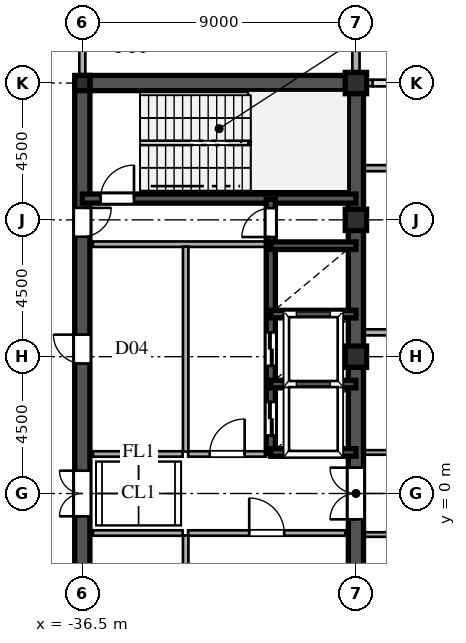
"""IFC4 building model, lengths in metres.
Left out: names, types, materials, properties, quantities, classifications, styles, units other than length and angle.
Written with IfcOpenShell. Run it as: python <this file> out.ifc"""

import sys

from ifc_helpers import new_model, si_unit, direction, frame, frame_2d, origin, origin_2d, place, context, subcontext, project, spatial, rectangle, hollow_rectangle, i_section, extrude, source, transform, mapped, element, fill, save


model = new_model("IFC4")
c1 = context("Model", 3, precision=1e-05, world=origin(), true_north=direction((0.0, 1.0)))
c2 = subcontext(c1, "Body", "Model", "MODEL_VIEW")
j1 = project(units=[si_unit("LENGTHUNIT", "METRE"), si_unit("PLANEANGLEUNIT", "RADIAN")], contexts=[c1])
p1 = place(None, origin())
s1 = spatial("IfcSite", under=j1, at=p1, CompositionType="ELEMENT")
p2 = place(p1, origin())
s2 = spatial("IfcBuilding", under=s1, at=p2, CompositionType="ELEMENT")
p3 = place(p2, frame((0.0, 0.0, 234.6)))
s3 = spatial("IfcBuildingStorey", under=s2, at=p3, CompositionType="ELEMENT", Elevation=234.6)
m1 = source(origin(), c2, "Body", "SweptSolid", [
    extrude(hollow_rectangle(XDim=0.7, YDim=0.7, WallThickness=0.03, at=origin_2d()), origin(), (0.0, 0.0, 1.0), 4.8),
])
for number, where, z_axis, x_axis in (
    (1, (-27.5, 4.5, 0.0), (0.0, 0.0, 1.0), (1.0, 0.0, 0.0)),
    (2, (-27.5, 9.0, 0.0), (0.0, 0.0, 1.0), (1.0, 0.0, 0.0)),
    (3, (-27.5, 13.5, 0.0), (0.0, 0.0, 1.0), (1.0, 0.0, 0.0)),
):
    element("IfcColumn", number, at=place(p3, frame(where, z_axis=z_axis, x_axis=x_axis)), inside=s3, PredefinedType="COLUMN", context=c2, shape_type="MappedRepresentation", body=[
        mapped(m1, transform((0.0, 0.0, 0.0), scale=1.0)),
    ])
m2 = source(origin(), c2, "Body", "SweptSolid", [
    extrude(i_section(OverallWidth=0.5, OverallDepth=0.5, WebThickness=0.02, FlangeThickness=0.032, at=origin_2d()), origin(), (0.0, 0.0, 1.0), 4.8),
])
p4 = place(p3, frame((-36.5, 13.5, 0.0), z_axis=(0.0, 0.0, 1.0), x_axis=(1.0, 0.0, 0.0)))
e4 = element("IfcColumn", 4, at=p4, inside=s3, PredefinedType="COLUMN", context=c2, shape_type="MappedRepresentation", body=[
    mapped(m2, transform((0.0, 0.0, 0.0), scale=1.0)),
])
p5 = place(p3, frame((-27.5, 13.755, 0.0), z_axis=(0.0, 0.0, 1.0), x_axis=(0.0, 1.0, 0.0)))
e5 = element("IfcWall", 5, at=p5, inside=s3, PredefinedType="SOLIDWALL", context=c2, shape_type="SweptSolid", body=[
    extrude(rectangle(XDim=0.62, YDim=0.24, at=frame_2d((0.31, 0.0))), origin(), (0.0, 0.0, 1.0), 4.08),
])
p6 = place(p3, frame((-27.5, 14.375, 0.0), z_axis=(0.0, 0.0, 1.0), x_axis=(0.0, 1.0, 0.0)))
e6 = element("IfcWall", 6, at=p6, inside=s3, PredefinedType="SOLIDWALL", context=c2, shape_type="SweptSolid", body=[
    extrude(rectangle(XDim=1.605, YDim=0.24, at=frame_2d((0.803, 0.0))), origin(), (0.0, 0.0, 1.0), 4.58),
])
p7 = place(p3, frame((-27.49, 13.5, 0.0), z_axis=(0.0, 0.0, 1.0), x_axis=(1.0, 0.0, 0.0)))
e7 = element("IfcWall", 7, at=p7, inside=s3, PredefinedType="SOLIDWALL", context=c2, shape_type="SweptSolid", body=[
    extrude(rectangle(XDim=0.54, YDim=0.21, at=frame_2d((0.27, 0.0))), origin(), (0.0, 0.0, 1.0), 2.78),
])
for number, where, z_axis, x_axis in (
    (8, (-27.5, -13.5, 0.0), (0.0, 0.0, 1.0), (0.0, 1.0, 0.0)),
    (9, (-27.5, 1.3, 0.0), (0.0, 0.0, 1.0), (0.0, 1.0, 0.0)),
):
    element("IfcWall", number, at=place(p3, frame(where, z_axis=z_axis, x_axis=x_axis)), inside=s3, PredefinedType="SHEAR", context=c2, shape_type="SweptSolid", body=[
        extrude(rectangle(XDim=12.2, YDim=0.5, at=frame_2d((6.1, 0.0))), origin(), (0.0, 0.0, 1.0), 4.58),
    ])
p8 = place(p3, frame((-27.5, -1.3, 0.0), z_axis=(0.0, 0.0, 1.0), x_axis=(0.0, 1.0, 0.0)))
e10 = element("IfcWall", 10, at=p8, inside=s3, PredefinedType="SHEAR", context=c2, shape_type="SweptSolid", body=[
    extrude(rectangle(XDim=2.6, YDim=0.5, at=frame_2d((1.3, 0.0))), origin(), (0.0, 0.0, 1.0), 4.58),
])
p9 = place(p8, frame((0.45, 0.0, 0.0)))
e11 = element("IfcOpeningElement", 11, at=p9, cuts=e10, PredefinedType="OPENING", context=c2, shape_type="SweptSolid", body=[
    extrude(rectangle(XDim=1.7, YDim=2.35, at=frame_2d((0.85, 1.175))), frame((0.0, 0.26, 0.0), z_axis=(0.0, -1.0, 0.0), x_axis=(1.0, 0.0, 0.0)), (0.0, 0.0, 1.0), 0.52),
])
p10 = place(p3, frame((-36.5, 13.5, 0.0), z_axis=(0.0, 0.0, 1.0), x_axis=(1.0, 0.0, 0.0)))
e12 = element("IfcWall", 12, at=p10, inside=s3, PredefinedType="SHEAR", context=c2, shape_type="SweptSolid", body=[
    extrude(rectangle(XDim=9.0, YDim=0.5, at=frame_2d((4.5, 0.0))), origin(), (0.0, 0.0, 1.0), 4.58),
])
p11 = place(p3, frame((-36.5, -1.3, 0.0), z_axis=(0.0, 0.0, 1.0), x_axis=(0.0, 1.0, 0.0)))
e13 = element("IfcWall", 13, at=p11, inside=s3, PredefinedType="SHEAR", context=c2, shape_type="SweptSolid", body=[
    extrude(rectangle(XDim=2.6, YDim=0.5, at=frame_2d((1.3, 0.0))), origin(), (0.0, 0.0, 1.0), 4.58),
])
p12 = place(p11, frame((0.55, 0.0, 0.0)))
e14 = element("IfcOpeningElement", 14, at=p12, cuts=e13, PredefinedType="OPENING", context=c2, shape_type="SweptSolid", body=[
    extrude(rectangle(XDim=1.5, YDim=2.3, at=frame_2d((0.75, 1.15))), frame((0.0, 0.26, 0.0), z_axis=(0.0, -1.0, 0.0), x_axis=(1.0, 0.0, 0.0)), (0.0, 0.0, 1.0), 0.52),
])
p13 = place(p3, frame((-36.5, 8.2, 0.0), z_axis=(0.0, 0.0, 1.0), x_axis=(0.0, 1.0, 0.0)))
e15 = element("IfcWall", 15, at=p13, inside=s3, PredefinedType="SHEAR", context=c2, shape_type="SweptSolid", body=[
    extrude(rectangle(XDim=5.45, YDim=0.5, at=frame_2d((2.725, 0.0))), origin(), (0.0, 0.0, 1.0), 4.58),
])
p14 = place(p13, frame((0.245, 0.0, 0.0)))
e16 = element("IfcOpeningElement", 16, at=p14, cuts=e15, PredefinedType="OPENING", context=c2, shape_type="SweptSolid", body=[
    extrude(rectangle(XDim=0.95, YDim=2.15, at=frame_2d((0.475, 1.075))), frame((0.0, 0.26, 0.0), z_axis=(0.0, -1.0, 0.0), x_axis=(1.0, 0.0, 0.0)), (0.0, 0.0, 1.0), 0.52),
])
p15 = place(p3, frame((-36.5, -6.5, 0.0), z_axis=(0.0, 0.0, 1.0), x_axis=(0.0, 1.0, 0.0)))
e17 = element("IfcWall", 17, at=p15, inside=s3, PredefinedType="SHEAR", context=c2, shape_type="SweptSolid", body=[
    extrude(rectangle(XDim=5.2, YDim=0.5, at=frame_2d((2.6, 0.0))), origin(), (0.0, 0.0, 1.0), 4.58),
])
p16 = place(p15, frame((2.125, 0.0, 0.0)))
e18 = element("IfcOpeningElement", 18, at=p16, cuts=e17, PredefinedType="OPENING", context=c2, shape_type="SweptSolid", body=[
    extrude(rectangle(XDim=0.95, YDim=2.15, at=frame_2d((0.475, 1.075))), frame((0.0, 0.26, 0.0), z_axis=(0.0, -1.0, 0.0), x_axis=(1.0, 0.0, 0.0)), (0.0, 0.0, 1.0), 0.52),
])
p17 = place(p3, frame((-36.5, 1.3, 0.0), z_axis=(0.0, 0.0, 1.0), x_axis=(0.0, 1.0, 0.0)))
e19 = element("IfcWall", 19, at=p17, inside=s3, PredefinedType="SHEAR", context=c2, shape_type="SweptSolid", body=[
    extrude(rectangle(XDim=6.9, YDim=0.5, at=frame_2d((3.45, 0.0))), origin(), (0.0, 0.0, 1.0), 4.58),
])
p18 = place(p17, frame((2.975, 0.0, 0.0)))
e20 = element("IfcOpeningElement", 20, at=p18, cuts=e19, PredefinedType="OPENING", context=c2, shape_type="SweptSolid", body=[
    extrude(rectangle(XDim=0.95, YDim=2.15, at=frame_2d((0.475, 1.075))), frame((0.0, 0.26, 0.0), z_axis=(0.0, -1.0, 0.0), x_axis=(1.0, 0.0, 0.0)), (0.0, 0.0, 1.0), 0.52),
])
p19 = place(p3, frame((-36.5, 9.7, 0.0), z_axis=(0.0, 0.0, 1.0), x_axis=(1.0, 0.0, 0.0)))
e21 = element("IfcWall", 21, at=p19, inside=s3, PredefinedType="SHEAR", context=c2, shape_type="SweptSolid", body=[
    extrude(rectangle(XDim=9.0, YDim=0.3, at=frame_2d((4.5, 0.0))), origin(), (0.0, 0.0, 1.0), 4.58),
])
p20 = place(p19, frame((0.6, 0.0, 0.0)))
e22 = element("IfcOpeningElement", 22, at=p20, cuts=e21, PredefinedType="OPENING", context=c2, shape_type="SweptSolid", body=[
    extrude(rectangle(XDim=1.1, YDim=2.2, at=frame_2d((0.55, 1.1))), frame((0.0, 0.16, 0.0), z_axis=(0.0, -1.0, 0.0), x_axis=(1.0, 0.0, 0.0)), (0.0, 0.0, 1.0), 0.32),
])
for number, where, z_axis, x_axis in (
    (23, (-30.3, 1.35, 0.0), (0.0, 0.0, 1.0), (1.0, 0.0, 0.0)),
    (24, (-30.3, 3.6, 0.0), (0.0, 0.0, 1.0), (1.0, 0.0, 0.0)),
    (25, (-30.3, 5.9, 0.0), (0.0, 0.0, 1.0), (1.0, 0.0, 0.0)),
    (26, (-30.3, 8.15, 0.0), (0.0, 0.0, 1.0), (1.0, 0.0, 0.0)),
):
    element("IfcWall", number, at=place(p3, frame(where, z_axis=z_axis, x_axis=x_axis)), inside=s3, PredefinedType="SHEAR", context=c2, shape_type="SweptSolid", body=[
        extrude(rectangle(XDim=2.8, YDim=0.25, at=frame_2d((1.4, 0.0))), origin(), (0.0, 0.0, 1.0), 4.58),
    ])
p21 = place(p3, frame((-30.3, 1.32, 0.0), z_axis=(0.0, 0.0, 1.0), x_axis=(0.0, 1.0, 0.0)))
e27 = element("IfcWall", 27, at=p21, inside=s3, PredefinedType="SHEAR", context=c2, shape_type="SweptSolid", body=[
    extrude(rectangle(XDim=2.28, YDim=0.3, at=frame_2d((1.14, 0.0))), origin(), (0.0, 0.0, 1.0), 4.58),
])
p22 = place(p21, frame((0.59, 0.0, 0.0)))
e28 = element("IfcOpeningElement", 28, at=p22, cuts=e27, PredefinedType="OPENING", context=c2, shape_type="SweptSolid", body=[
    extrude(rectangle(XDim=1.1, YDim=2.2, at=frame_2d((0.55, 1.1))), frame((0.0, 0.16, 0.0), z_axis=(0.0, -1.0, 0.0), x_axis=(1.0, 0.0, 0.0)), (0.0, 0.0, 1.0), 0.32),
])
p23 = place(p3, frame((-30.3, 3.6, 0.0), z_axis=(0.0, 0.0, 1.0), x_axis=(0.0, 1.0, 0.0)))
e29 = element("IfcWall", 29, at=p23, inside=s3, PredefinedType="SHEAR", context=c2, shape_type="SweptSolid", body=[
    extrude(rectangle(XDim=2.3, YDim=0.3, at=frame_2d((1.15, 0.0))), origin(), (0.0, 0.0, 1.0), 4.58),
])
p24 = place(p23, frame((0.6, 0.0, 0.0)))
e30 = element("IfcOpeningElement", 30, at=p24, cuts=e29, PredefinedType="OPENING", context=c2, shape_type="SweptSolid", body=[
    extrude(rectangle(XDim=1.1, YDim=2.2, at=frame_2d((0.55, 1.1))), frame((0.0, 0.16, 0.0), z_axis=(0.0, -1.0, 0.0), x_axis=(1.0, 0.0, 0.0)), (0.0, 0.0, 1.0), 0.32),
])
p25 = place(p3, frame((-30.3, 5.9, 0.0), z_axis=(0.0, 0.0, 1.0), x_axis=(0.0, 1.0, 0.0)))
e31 = element("IfcWall", 31, at=p25, inside=s3, PredefinedType="SHEAR", context=c2, shape_type="SweptSolid", body=[
    extrude(rectangle(XDim=2.25, YDim=0.3, at=frame_2d((1.125, 0.0))), origin(), (0.0, 0.0, 1.0), 4.58),
])
p26 = place(p3, frame((-30.3, 8.15, 0.0), z_axis=(0.0, 0.0, 1.0), x_axis=(0.0, 1.0, 0.0)))
e32 = element("IfcWall", 32, at=p26, inside=s3, PredefinedType="SHEAR", context=c2, shape_type="SweptSolid", body=[
    extrude(rectangle(XDim=1.53, YDim=0.3, at=frame_2d((0.765, 0.0))), origin(), (0.0, 0.0, 1.0), 4.58),
])
p27 = place(p26, frame((0.285, 0.0, 0.0)))
e33 = element("IfcOpeningElement", 33, at=p27, cuts=e32, PredefinedType="OPENING", context=c2, shape_type="SweptSolid", body=[
    extrude(rectangle(XDim=0.95, YDim=2.15, at=frame_2d((0.475, 1.075))), frame((0.0, 0.16, 0.0), z_axis=(0.0, -1.0, 0.0), x_axis=(1.0, 0.0, 0.0)), (0.0, 0.0, 1.0), 0.32),
])
p28 = place(p3, frame((-36.15, 8.2, 0.0), z_axis=(0.0, 0.0, 1.0), x_axis=(1.0, 0.0, 0.0)))
e34 = element("IfcWall", 34, at=p28, inside=s3, PredefinedType="PARTITIONING", context=c2, shape_type="SweptSolid", body=[
    extrude(rectangle(XDim=5.7, YDim=0.18, at=frame_2d((2.85, 0.0))), origin(), (0.0, 0.0, 1.0), 4.58),
])
p29 = place(p3, frame((-33.1, -6.42, 0.0), z_axis=(0.0, 0.0, 1.0), x_axis=(0.0, 1.0, 0.0)))
e35 = element("IfcWall", 35, at=p29, inside=s3, PredefinedType="PARTITIONING", context=c2, shape_type="SweptSolid", body=[
    extrude(rectangle(XDim=5.04, YDim=0.18, at=frame_2d((2.52, 0.0))), origin(), (0.0, 0.0, 1.0), 4.58),
])
p30 = place(p3, frame((-33.1, 1.38, 0.0), z_axis=(0.0, 0.0, 1.0), x_axis=(0.0, 1.0, 0.0)))
e36 = element("IfcWall", 36, at=p30, inside=s3, PredefinedType="PARTITIONING", context=c2, shape_type="SweptSolid", body=[
    extrude(rectangle(XDim=6.74, YDim=0.18, at=frame_2d((3.37, 0.0))), origin(), (0.0, 0.0, 1.0), 4.58),
])
p31 = place(p3, frame((-33.02, -1.3, 0.0), z_axis=(0.0, 0.0, 1.0), x_axis=(1.0, 0.0, 0.0)))
e37 = element("IfcWall", 37, at=p31, inside=s3, PredefinedType="PARTITIONING", context=c2, shape_type="SweptSolid", body=[
    extrude(rectangle(XDim=5.17, YDim=0.18, at=frame_2d((2.585, 0.0))), origin(), (0.0, 0.0, 1.0), 4.58),
])
p32 = place(p31, frame((2.01, 0.0, 0.0)))
e38 = element("IfcOpeningElement", 38, at=p32, cuts=e37, PredefinedType="OPENING", context=c2, shape_type="SweptSolid", body=[
    extrude(rectangle(XDim=1.15, YDim=2.2, at=frame_2d((0.575, 1.1))), frame((0.0, 0.1, 0.0), z_axis=(0.0, -1.0, 0.0), x_axis=(1.0, 0.0, 0.0)), (0.0, 0.0, 1.0), 0.2),
])
p33 = place(p3, frame((-33.02, 1.3, 0.0), z_axis=(0.0, 0.0, 1.0), x_axis=(1.0, 0.0, 0.0)))
e39 = element("IfcWall", 39, at=p33, inside=s3, PredefinedType="PARTITIONING", context=c2, shape_type="SweptSolid", body=[
    extrude(rectangle(XDim=2.57, YDim=0.18, at=frame_2d((1.285, 0.0))), origin(), (0.0, 0.0, 1.0), 4.58),
])
p34 = place(p33, frame((0.71, 0.0, 0.0)))
e40 = element("IfcOpeningElement", 40, at=p34, cuts=e39, PredefinedType="OPENING", context=c2, shape_type="SweptSolid", body=[
    extrude(rectangle(XDim=1.15, YDim=2.2, at=frame_2d((0.575, 1.1))), frame((0.0, 0.1, 0.0), z_axis=(0.0, -1.0, 0.0), x_axis=(1.0, 0.0, 0.0)), (0.0, 0.0, 1.0), 0.2),
])
for number, where, z_axis, x_axis in (
    (41, (-36.15, -1.3, 0.0), (0.0, 0.0, 1.0), (1.0, 0.0, 0.0)),
    (42, (-36.15, 1.3, 0.0), (0.0, 0.0, 1.0), (1.0, 0.0, 0.0)),
):
    element("IfcWall", number, at=place(p3, frame(where, z_axis=z_axis, x_axis=x_axis)), inside=s3, PredefinedType="PARTITIONING", context=c2, shape_type="SweptSolid", body=[
        extrude(rectangle(XDim=2.95, YDim=0.18, at=frame_2d((1.475, 0.0))), origin(), (0.0, 0.0, 1.0), 4.58),
    ])
p35 = place(p3, frame((-27.245, -1.35, 0.0), z_axis=(0.0, 0.0, 1.0), x_axis=(1.0, 0.0, 0.0)))
e43 = element("IfcWall", 43, at=p35, inside=s3, PredefinedType="PARTITIONING", context=c2, shape_type="SweptSolid", body=[
    extrude(rectangle(XDim=19.46, YDim=0.15, at=frame_2d((9.73, 0.0))), origin(), (0.0, 0.0, 1.0), 4.58),
])
p36 = place(p35, frame((13.02, 0.0, 0.0)))
e44 = element("IfcOpeningElement", 44, at=p36, cuts=e43, PredefinedType="OPENING", context=c2, shape_type="SweptSolid", body=[
    extrude(rectangle(XDim=0.95, YDim=2.15, at=frame_2d((0.475, 1.075))), frame((0.0, 0.085, 0.0), z_axis=(0.0, -1.0, 0.0), x_axis=(1.0, 0.0, 0.0)), (0.0, 0.0, 1.0), 0.17),
])
p37 = place(p3, frame((-27.245, 1.35, 0.0), z_axis=(0.0, 0.0, 1.0), x_axis=(1.0, 0.0, 0.0)))
e45 = element("IfcWall", 45, at=p37, inside=s3, PredefinedType="PARTITIONING", context=c2, shape_type="SweptSolid", body=[
    extrude(rectangle(XDim=19.46, YDim=0.15, at=frame_2d((9.73, 0.0))), origin(), (0.0, 0.0, 1.0), 4.58),
])
p38 = place(p37, frame((13.02, 0.0, 0.0)))
e46 = element("IfcOpeningElement", 46, at=p38, cuts=e45, PredefinedType="OPENING", context=c2, shape_type="SweptSolid", body=[
    extrude(rectangle(XDim=0.95, YDim=2.15, at=frame_2d((0.475, 1.075))), frame((0.0, 0.085, 0.0), z_axis=(0.0, -1.0, 0.0), x_axis=(1.0, 0.0, 0.0)), (0.0, 0.0, 1.0), 0.17),
])
p39 = place(p3, frame((-27.245, 5.3, 0.0), z_axis=(0.0, 0.0, 1.0), x_axis=(1.0, 0.0, 0.0)))
e47 = element("IfcWall", 47, at=p39, inside=s3, PredefinedType="PARTITIONING", context=c2, shape_type="SweptSolid", body=[
    extrude(rectangle(XDim=54.49, YDim=0.2, at=frame_2d((27.245, 0.0))), origin(), (0.0, 0.0, 1.0), 4.58),
])
p40 = place(p39, frame((25.77, 0.0, 0.0)))
e48 = element("IfcOpeningElement", 48, at=p40, cuts=e47, PredefinedType="OPENING", context=c2, shape_type="SweptSolid", body=[
    extrude(rectangle(XDim=1.15, YDim=2.2, at=frame_2d((0.575, 1.1))), frame((0.0, 0.11, 0.0), z_axis=(0.0, -1.0, 0.0), x_axis=(1.0, 0.0, 0.0)), (0.0, 0.0, 1.0), 0.22),
])
p41 = place(p39, frame((35.17, 0.0, 0.0)))
e49 = element("IfcOpeningElement", 49, at=p41, cuts=e47, PredefinedType="OPENING", context=c2, shape_type="SweptSolid", body=[
    extrude(rectangle(XDim=1.15, YDim=2.2, at=frame_2d((0.575, 1.1))), frame((0.0, 0.11, 0.0), z_axis=(0.0, -1.0, 0.0), x_axis=(1.0, 0.0, 0.0)), (0.0, 0.0, 1.0), 0.22),
])
p42 = place(p39, frame((17.67, 0.0, 0.0)))
e50 = element("IfcOpeningElement", 50, at=p42, cuts=e47, PredefinedType="OPENING", context=c2, shape_type="SweptSolid", body=[
    extrude(rectangle(XDim=1.15, YDim=2.2, at=frame_2d((0.575, 1.1))), frame((0.0, 0.11, 0.0), z_axis=(0.0, -1.0, 0.0), x_axis=(1.0, 0.0, 0.0)), (0.0, 0.0, 1.0), 0.22),
])
p43 = place(p39, frame((46.055, 0.0, 0.0)))
e51 = element("IfcOpeningElement", 51, at=p43, cuts=e47, PredefinedType="OPENING", context=c2, shape_type="SweptSolid", body=[
    extrude(rectangle(XDim=0.88, YDim=2.1, at=frame_2d((0.44, 1.05))), frame((0.0, 0.11, 0.0), z_axis=(0.0, -1.0, 0.0), x_axis=(1.0, 0.0, 0.0)), (0.0, 0.0, 1.0), 0.22),
])
p44 = place(p39, frame((51.405, 0.0, 0.0)))
e52 = element("IfcOpeningElement", 52, at=p44, cuts=e47, PredefinedType="OPENING", context=c2, shape_type="SweptSolid", body=[
    extrude(rectangle(XDim=0.88, YDim=2.1, at=frame_2d((0.44, 1.05))), frame((0.0, 0.11, 0.0), z_axis=(0.0, -1.0, 0.0), x_axis=(1.0, 0.0, 0.0)), (0.0, 0.0, 1.0), 0.22),
])
p45 = place(p3, frame((-27.245, 10.7, 0.0), z_axis=(0.0, 0.0, 1.0), x_axis=(1.0, 0.0, 0.0)))
e53 = element("IfcWall", 53, at=p45, inside=s3, PredefinedType="PARTITIONING", context=c2, shape_type="SweptSolid", body=[
    extrude(rectangle(XDim=54.49, YDim=0.2, at=frame_2d((27.245, 0.0))), origin(), (0.0, 0.0, 1.0), 4.58),
])
p46 = place(p45, frame((25.77, 0.0, 0.0)))
e54 = element("IfcOpeningElement", 54, at=p46, cuts=e53, PredefinedType="OPENING", context=c2, shape_type="SweptSolid", body=[
    extrude(rectangle(XDim=1.15, YDim=2.2, at=frame_2d((0.575, 1.1))), frame((0.0, 0.11, 0.0), z_axis=(0.0, -1.0, 0.0), x_axis=(1.0, 0.0, 0.0)), (0.0, 0.0, 1.0), 0.22),
])
p47 = place(p3, frame((-36.5, 13.755, 0.0), z_axis=(0.0, 0.0, 1.0), x_axis=(0.0, 1.0, 0.0)))
e55 = element("IfcWall", 55, at=p47, inside=s3, PredefinedType="PARTITIONING", context=c2, shape_type="SweptSolid", body=[
    extrude(rectangle(XDim=1.76, YDim=0.2, at=frame_2d((0.88, 0.0))), origin(), (0.0, 0.0, 1.0), 3.98),
])
m3 = source(origin(), c2, "Body", "SweptSolid", [
    extrude(rectangle(XDim=1.7, YDim=2.35, at=frame_2d((0.85, 1.175))), frame((0.0, 0.025, 0.0), z_axis=(0.0, -1.0, 0.0), x_axis=(1.0, 0.0, 0.0)), (0.0, 0.0, 1.0), 0.05),
])
p48 = place(p9, origin())
e56 = element("IfcDoor", 56, at=p48, inside=s3, OperationType="DOUBLE_SWING_LEFT", PredefinedType="DOOR", context=c2, shape_type="MappedRepresentation", body=[
    mapped(m3, transform((0.0, 0.0, 0.0), scale=1.0)),
])
fill(e11, e56)
m4 = source(origin(), c2, "Body", "SweptSolid", [
    extrude(rectangle(XDim=1.5, YDim=2.3, at=frame_2d((0.75, 1.15))), frame((0.0, 0.025, 0.0), z_axis=(0.0, -1.0, 0.0), x_axis=(1.0, 0.0, 0.0)), (0.0, 0.0, 1.0), 0.05),
])
p49 = place(p12, origin())
e57 = element("IfcDoor", 57, at=p49, inside=s3, OperationType="DOUBLE_SWING_LEFT", PredefinedType="DOOR", context=c2, shape_type="MappedRepresentation", body=[
    mapped(m4, transform((0.0, 0.0, 0.0), scale=1.0)),
])
fill(e14, e57)
m5 = source(origin(), c2, "Body", "SweptSolid", [
    extrude(rectangle(XDim=0.95, YDim=2.15, at=frame_2d((0.475, 1.075))), frame((0.0, 0.025, 0.0), z_axis=(0.0, -1.0, 0.0), x_axis=(1.0, 0.0, 0.0)), (0.0, 0.0, 1.0), 0.05),
])
p50 = place(p14, frame((0.95, 0.0, 0.0), z_axis=(0.0, 0.0, 1.0), x_axis=(-1.0, 0.0, 0.0)))
e58 = element("IfcDoor", 58, at=p50, inside=s3, OperationType="SINGLE_SWING_RIGHT", PredefinedType="DOOR", context=c2, shape_type="MappedRepresentation", body=[
    mapped(m5, transform((0.0, 0.0, 0.0), scale=1.0)),
])
fill(e16, e58)
p51 = place(p18, origin())
e59 = element("IfcDoor", 59, at=p51, inside=s3, OperationType="SINGLE_SWING_RIGHT", PredefinedType="DOOR", context=c2, shape_type="MappedRepresentation", body=[
    mapped(m5, transform((0.0, 0.0, 0.0), scale=1.0)),
])
fill(e20, e59)
m6 = source(origin(), c2, "Body", "SweptSolid", [
    extrude(rectangle(XDim=1.1, YDim=2.2, at=frame_2d((0.55, 1.1))), frame((0.0, 0.025, 0.0), z_axis=(0.0, -1.0, 0.0), x_axis=(1.0, 0.0, 0.0)), (0.0, 0.0, 1.0), 0.05),
])
p52 = place(p20, origin())
e60 = element("IfcDoor", 60, at=p52, inside=s3, OperationType="SINGLE_SWING_RIGHT", PredefinedType="DOOR", context=c2, shape_type="MappedRepresentation", body=[
    mapped(m6, transform((0.0, 0.0, 0.0), scale=1.0)),
])
fill(e22, e60)
m7 = source(origin(), c2, "Body", "SweptSolid", [
    extrude(rectangle(XDim=1.1, YDim=2.2, at=frame_2d((0.55, 1.1))), frame((0.0, 0.025, 0.0), z_axis=(0.0, -1.0, 0.0), x_axis=(1.0, 0.0, 0.0)), (0.0, 0.0, 1.0), 0.05),
])
p53 = place(p22, origin())
e61 = element("IfcDoor", 61, at=p53, inside=s3, OperationType="DOUBLE_DOOR_SLIDING", PredefinedType="DOOR", context=c2, shape_type="MappedRepresentation", body=[
    mapped(m7, transform((0.0, 0.0, 0.0), scale=1.0)),
])
fill(e28, e61)
p54 = place(p24, origin())
e62 = element("IfcDoor", 62, at=p54, inside=s3, OperationType="DOUBLE_DOOR_SLIDING", PredefinedType="DOOR", context=c2, shape_type="MappedRepresentation", body=[
    mapped(m7, transform((0.0, 0.0, 0.0), scale=1.0)),
])
fill(e30, e62)
p55 = place(p27, origin())
e63 = element("IfcDoor", 63, at=p55, inside=s3, OperationType="SINGLE_SWING_LEFT", PredefinedType="DOOR", context=c2, shape_type="MappedRepresentation", body=[
    mapped(m5, transform((0.0, 0.0, 0.0), scale=1.0)),
])
fill(e33, e63)
m8 = source(origin(), c2, "Body", "SweptSolid", [
    extrude(rectangle(XDim=1.15, YDim=2.2, at=frame_2d((0.575, 1.1))), frame((0.0, 0.025, 0.0), z_axis=(0.0, -1.0, 0.0), x_axis=(1.0, 0.0, 0.0)), (0.0, 0.0, 1.0), 0.05),
])
p56 = place(p32, origin())
e64 = element("IfcDoor", 64, at=p56, inside=s3, OperationType="SINGLE_SWING_LEFT", PredefinedType="DOOR", context=c2, shape_type="MappedRepresentation", body=[
    mapped(m8, transform((0.0, 0.0, 0.0), scale=1.0)),
])
fill(e38, e64)
p57 = place(p34, origin())
e65 = element("IfcDoor", 65, at=p57, inside=s3, OperationType="SINGLE_SWING_RIGHT", PredefinedType="DOOR", context=c2, shape_type="MappedRepresentation", body=[
    mapped(m8, transform((0.0, 0.0, 0.0), scale=1.0)),
])
fill(e40, e65)
save(model, sys.argv[1])
